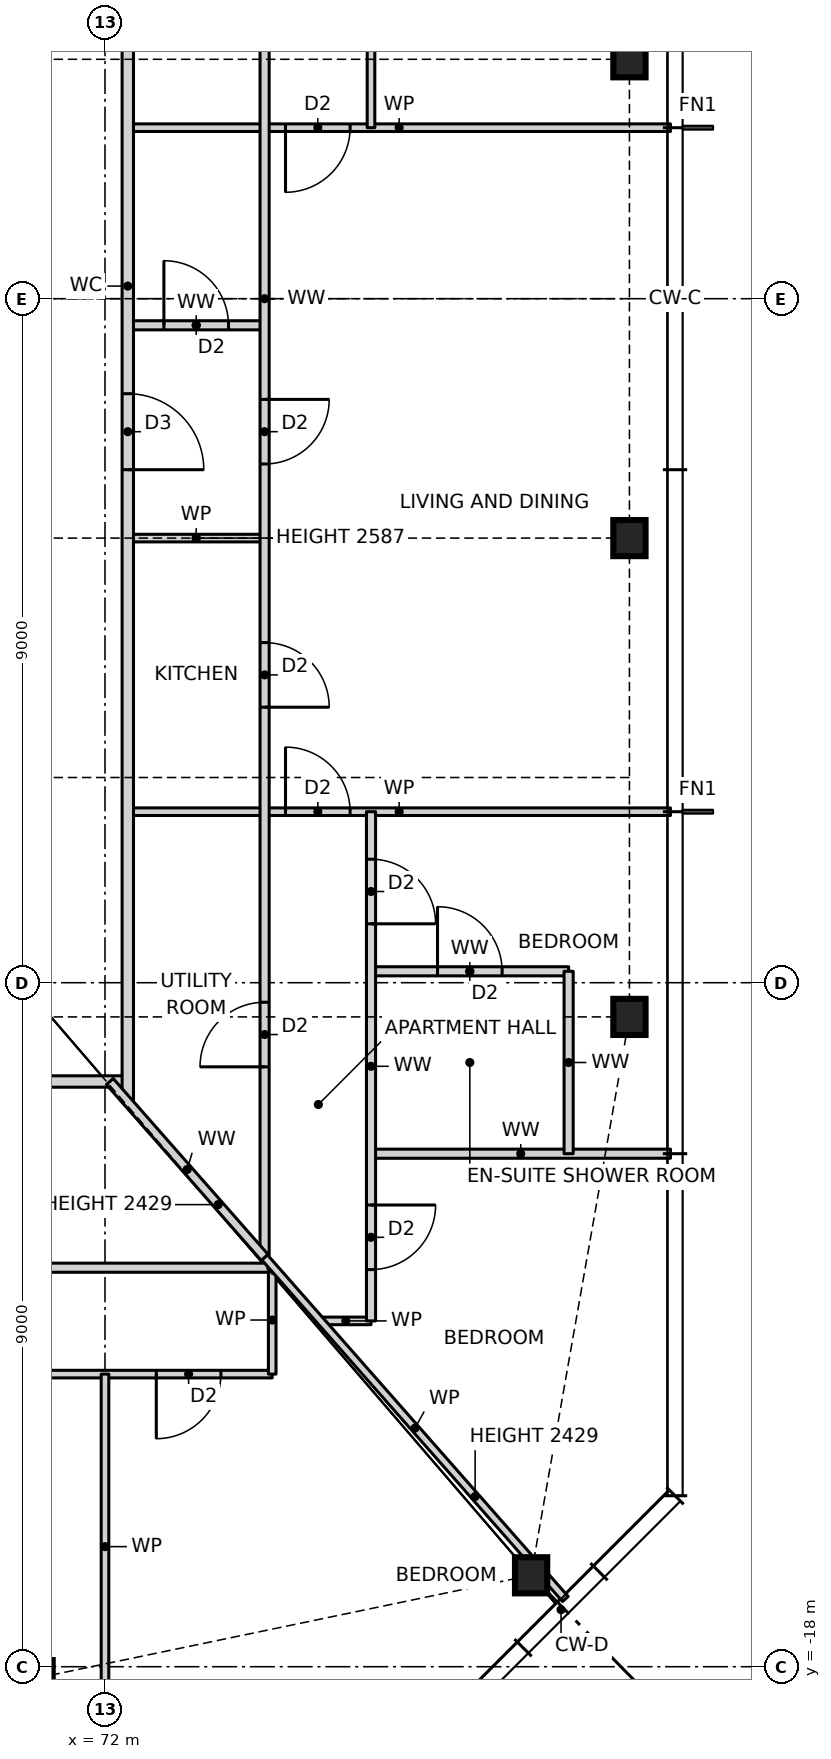
"""IFC4 building model, lengths in metres.
Left out: names, types, materials, properties, quantities, classifications, styles, units other than length and angle.
Written with IfcOpenShell. Run it as: python <this file> out.ifc"""

import sys

from ifc_helpers import new_model, si_unit, direction, frame, frame_2d, origin, origin_2d, place, context, subcontext, project, spatial, rectangle, i_section, extrude, element, fill, save


model = new_model("IFC4")
c1 = context("Model", 3, precision=1e-05, world=origin(), true_north=direction((0.0, 1.0)))
c2 = subcontext(c1, "Body", "Model", "MODEL_VIEW")
j1 = project(units=[si_unit("LENGTHUNIT", "METRE"), si_unit("PLANEANGLEUNIT", "RADIAN")], contexts=[c1])
p1 = place(None, origin())
s1 = spatial("IfcSite", under=j1, at=p1, CompositionType="ELEMENT")
p2 = place(p1, origin())
s2 = spatial("IfcBuilding", under=s1, at=p2, CompositionType="ELEMENT")
p3 = place(p2, frame((0.0, 0.0, 43.0)))
s3 = spatial("IfcBuildingStorey", under=s2, at=p3, CompositionType="ELEMENT", Elevation=43.0)
for number, where, z_axis, x_axis in (
    (1, (71.1, -18.15, 0.0), (0.0, 0.0, 1.0), (1.0, 0.0, 0.0)),
    (2, (77.606, -16.797, 0.0), (0.0, 0.0, 1.0), (1.0, 0.0, 0.0)),
    (3, (78.9, -9.45, 0.0), (0.0, 0.0, 1.0), (1.0, 0.0, 0.0)),
    (4, (78.9, -3.15, 0.0), (0.0, 0.0, 1.0), (1.0, 0.0, 0.0)),
    (5, (78.9, 3.15, 0.0), (0.0, 0.0, 1.0), (1.0, 0.0, 0.0)),
):
    element("IfcColumn", number, at=place(p3, frame(where, z_axis=z_axis, x_axis=x_axis)), inside=s3, PredefinedType="COLUMN", context=c2, shape_type="SweptSolid", body=[
        extrude(i_section(OverallWidth=0.424, OverallDepth=0.475, WebThickness=0.048, FlangeThickness=0.077, at=origin_2d()), origin(), (0.0, 0.0, 1.0), 3.5),
    ])
p4 = place(p3, frame((63.0, -14.15, 0.0), z_axis=(0.0, 0.0, 1.0), x_axis=(1.0, 0.0, 0.0)))
e6 = element("IfcWall", 6, at=p4, inside=s3, PredefinedType="PARTITIONING", context=c2, shape_type="SweptSolid", body=[
    extrude(rectangle(XDim=11.2, YDim=0.1, at=frame_2d((5.6, 0.0))), origin(), (0.0, 0.0, 1.0), 3.27),
])
p5 = place(p4, frame((1.825, 0.0, 0.0)))
e7 = element("IfcOpeningElement", 7, at=p5, cuts=e6, PredefinedType="OPENING", context=c2, shape_type="SweptSolid", body=[
    extrude(rectangle(XDim=0.85, YDim=2.1, at=frame_2d((0.425, 1.05))), frame((0.0, 0.06, 0.0), z_axis=(0.0, -1.0, 0.0), x_axis=(1.0, 0.0, 0.0)), (0.0, 0.0, 1.0), 0.12),
])
p6 = place(p4, frame((6.325, 0.0, 0.0)))
e8 = element("IfcOpeningElement", 8, at=p6, cuts=e6, PredefinedType="OPENING", context=c2, shape_type="SweptSolid", body=[
    extrude(rectangle(XDim=0.85, YDim=2.1, at=frame_2d((0.425, 1.05))), frame((0.0, 0.06, 0.0), z_axis=(0.0, -1.0, 0.0), x_axis=(1.0, 0.0, 0.0)), (0.0, 0.0, 1.0), 0.12),
])
p7 = place(p4, frame((9.675, 0.0, 0.0)))
e9 = element("IfcOpeningElement", 9, at=p7, cuts=e6, PredefinedType="OPENING", context=c2, shape_type="SweptSolid", body=[
    extrude(rectangle(XDim=0.85, YDim=2.1, at=frame_2d((0.425, 1.05))), frame((0.0, 0.06, 0.0), z_axis=(0.0, -1.0, 0.0), x_axis=(1.0, 0.0, 0.0)), (0.0, 0.0, 1.0), 0.12),
])
p8 = place(p3, frame((74.836, -13.45, 0.0), z_axis=(0.0, 0.0, 1.0), x_axis=(1.0, 0.0, 0.0)))
e10 = element("IfcWall", 10, at=p8, inside=s3, PredefinedType="PARTITIONING", context=c2, shape_type="SweptSolid", body=[
    extrude(rectangle(XDim=0.664, YDim=0.1, at=frame_2d((0.332, 0.0))), origin(), (0.0, 0.0, 1.0), 3.27),
])
p9 = place(p3, frame((54.0, -12.75, 0.0), z_axis=(0.0, 0.0, 1.0), x_axis=(1.0, 0.0, 0.0)))
e11 = element("IfcWall", 11, at=p9, inside=s3, PredefinedType="PARTITIONING", context=c2, shape_type="SweptSolid", body=[
    extrude(rectangle(XDim=20.2, YDim=0.12, at=frame_2d((10.1, 0.0))), origin(), (0.0, 0.0, 1.0), 3.27),
])
p10 = place(p9, frame((1.375, 0.0, 0.0)))
e12 = element("IfcOpeningElement", 12, at=p10, cuts=e11, PredefinedType="OPENING", context=c2, shape_type="SweptSolid", body=[
    extrude(rectangle(XDim=0.85, YDim=2.1, at=frame_2d((0.425, 1.05))), frame((0.0, 0.07, 0.0), z_axis=(0.0, -1.0, 0.0), x_axis=(1.0, 0.0, 0.0)), (0.0, 0.0, 1.0), 0.14),
])
p11 = place(p9, frame((4.575, 0.0, 0.0)))
e13 = element("IfcOpeningElement", 13, at=p11, cuts=e11, PredefinedType="OPENING", context=c2, shape_type="SweptSolid", body=[
    extrude(rectangle(XDim=0.85, YDim=2.1, at=frame_2d((0.425, 1.05))), frame((0.0, 0.07, 0.0), z_axis=(0.0, -1.0, 0.0), x_axis=(1.0, 0.0, 0.0)), (0.0, 0.0, 1.0), 0.14),
])
p12 = place(p9, frame((10.225, 0.0, 0.0)))
e14 = element("IfcOpeningElement", 14, at=p12, cuts=e11, PredefinedType="OPENING", context=c2, shape_type="SweptSolid", body=[
    extrude(rectangle(XDim=0.85, YDim=2.1, at=frame_2d((0.425, 1.05))), frame((0.0, 0.07, 0.0), z_axis=(0.0, -1.0, 0.0), x_axis=(1.0, 0.0, 0.0)), (0.0, 0.0, 1.0), 0.14),
])
p13 = place(p9, frame((15.825, 0.0, 0.0)))
e15 = element("IfcOpeningElement", 15, at=p13, cuts=e11, PredefinedType="OPENING", context=c2, shape_type="SweptSolid", body=[
    extrude(rectangle(XDim=0.85, YDim=2.1, at=frame_2d((0.425, 1.05))), frame((0.0, 0.07, 0.0), z_axis=(0.0, -1.0, 0.0), x_axis=(1.0, 0.0, 0.0)), (0.0, 0.0, 1.0), 0.14),
])
p14 = place(p3, frame((75.5, -11.25, 0.0), z_axis=(0.0, 0.0, 1.0), x_axis=(1.0, 0.0, 0.0)))
e16 = element("IfcWall", 16, at=p14, inside=s3, PredefinedType="PARTITIONING", context=c2, shape_type="SweptSolid", body=[
    extrude(rectangle(XDim=3.94, YDim=0.12, at=frame_2d((1.97, 0.0))), origin(), (0.0, 0.0, 1.0), 3.27),
])
p15 = place(p3, frame((53.7, -10.3, 0.0), z_axis=(0.0, 0.0, 1.0), x_axis=(1.0, 0.0, 0.0)))
e17 = element("IfcWall", 17, at=p15, inside=s3, PredefinedType="PARTITIONING", context=c2, shape_type="SweptSolid", body=[
    extrude(rectangle(XDim=18.6, YDim=0.15, at=frame_2d((9.3, 0.0))), origin(), (0.0, 0.0, 1.0), 3.27),
])
p16 = place(p15, frame((4.8, 0.0, 0.0)))
e18 = element("IfcOpeningElement", 18, at=p16, cuts=e17, PredefinedType="OPENING", context=c2, shape_type="SweptSolid", body=[
    extrude(rectangle(XDim=1.0, YDim=2.1, at=frame_2d((0.5, 1.05))), frame((0.0, 0.085, 0.0), z_axis=(0.0, -1.0, 0.0), x_axis=(1.0, 0.0, 0.0)), (0.0, 0.0, 1.0), 0.17),
])
p17 = place(p3, frame((75.5, -8.85, 0.0), z_axis=(0.0, 0.0, 1.0), x_axis=(1.0, 0.0, 0.0)))
e19 = element("IfcWall", 19, at=p17, inside=s3, PredefinedType="PARTITIONING", context=c2, shape_type="SweptSolid", body=[
    extrude(rectangle(XDim=2.6, YDim=0.12, at=frame_2d((1.3, 0.0))), origin(), (0.0, 0.0, 1.0), 3.27),
])
p18 = place(p17, frame((0.875, 0.0, 0.0)))
e20 = element("IfcOpeningElement", 20, at=p18, cuts=e19, PredefinedType="OPENING", context=c2, shape_type="SweptSolid", body=[
    extrude(rectangle(XDim=0.85, YDim=2.1, at=frame_2d((0.425, 1.05))), frame((0.0, 0.07, 0.0), z_axis=(0.0, -1.0, 0.0), x_axis=(1.0, 0.0, 0.0)), (0.0, 0.0, 1.0), 0.14),
])
p19 = place(p3, frame((72.3, -6.75, 0.0), z_axis=(0.0, 0.0, 1.0), x_axis=(1.0, 0.0, 0.0)))
e21 = element("IfcWall", 21, at=p19, inside=s3, PredefinedType="PARTITIONING", context=c2, shape_type="SweptSolid", body=[
    extrude(rectangle(XDim=7.14, YDim=0.1, at=frame_2d((3.57, 0.0))), origin(), (0.0, 0.0, 1.0), 3.27),
])
p20 = place(p19, frame((2.075, 0.0, 0.0)))
e22 = element("IfcOpeningElement", 22, at=p20, cuts=e21, PredefinedType="OPENING", context=c2, shape_type="SweptSolid", body=[
    extrude(rectangle(XDim=0.85, YDim=2.1, at=frame_2d((0.425, 1.05))), frame((0.0, 0.06, 0.0), z_axis=(0.0, -1.0, 0.0), x_axis=(1.0, 0.0, 0.0)), (0.0, 0.0, 1.0), 0.12),
])
p21 = place(p3, frame((72.3, -3.15, 0.0), z_axis=(0.0, 0.0, 1.0), x_axis=(1.0, 0.0, 0.0)))
e23 = element("IfcWall", 23, at=p21, inside=s3, PredefinedType="PARTITIONING", context=c2, shape_type="SweptSolid", body=[
    extrude(rectangle(XDim=1.8, YDim=0.1, at=frame_2d((0.9, 0.0))), origin(), (0.0, 0.0, 1.0), 2.587),
])
p22 = place(p3, frame((72.3, -0.35, 0.0), z_axis=(0.0, 0.0, 1.0), x_axis=(1.0, 0.0, 0.0)))
e24 = element("IfcWall", 24, at=p22, inside=s3, PredefinedType="PARTITIONING", context=c2, shape_type="SweptSolid", body=[
    extrude(rectangle(XDim=1.8, YDim=0.12, at=frame_2d((0.9, 0.0))), origin(), (0.0, 0.0, 1.0), 3.27),
])
p23 = place(p22, frame((0.475, 0.0, 0.0)))
e25 = element("IfcOpeningElement", 25, at=p23, cuts=e24, PredefinedType="OPENING", context=c2, shape_type="SweptSolid", body=[
    extrude(rectangle(XDim=0.85, YDim=2.1, at=frame_2d((0.425, 1.05))), frame((0.0, 0.07, 0.0), z_axis=(0.0, -1.0, 0.0), x_axis=(1.0, 0.0, 0.0)), (0.0, 0.0, 1.0), 0.14),
])
p24 = place(p3, frame((72.3, 2.25, 0.0), z_axis=(0.0, 0.0, 1.0), x_axis=(1.0, 0.0, 0.0)))
e26 = element("IfcWall", 26, at=p24, inside=s3, PredefinedType="PARTITIONING", context=c2, shape_type="SweptSolid", body=[
    extrude(rectangle(XDim=7.14, YDim=0.1, at=frame_2d((3.57, 0.0))), origin(), (0.0, 0.0, 1.0), 3.27),
])
p25 = place(p24, frame((2.075, 0.0, 0.0)))
e27 = element("IfcOpeningElement", 27, at=p25, cuts=e26, PredefinedType="OPENING", context=c2, shape_type="SweptSolid", body=[
    extrude(rectangle(XDim=0.85, YDim=2.1, at=frame_2d((0.425, 1.05))), frame((0.0, 0.06, 0.0), z_axis=(0.0, -1.0, 0.0), x_axis=(1.0, 0.0, 0.0)), (0.0, 0.0, 1.0), 0.12),
])
p26 = place(p3, frame((78.1, -11.25, 0.0), z_axis=(0.0, 0.0, 1.0), x_axis=(0.0, 1.0, 0.0)))
e28 = element("IfcWall", 28, at=p26, inside=s3, PredefinedType="PARTITIONING", context=c2, shape_type="SweptSolid", body=[
    extrude(rectangle(XDim=2.4, YDim=0.12, at=frame_2d((1.2, 0.0))), origin(), (0.0, 0.0, 1.0), 3.27),
])
p27 = place(p3, frame((75.5, -13.45, 0.0), z_axis=(0.0, 0.0, 1.0), x_axis=(0.0, 1.0, 0.0)))
e29 = element("IfcWall", 29, at=p27, inside=s3, PredefinedType="PARTITIONING", context=c2, shape_type="SweptSolid", body=[
    extrude(rectangle(XDim=6.7, YDim=0.12, at=frame_2d((3.35, 0.0))), origin(), (0.0, 0.0, 1.0), 3.27),
])
p28 = place(p27, frame((5.225, 0.0, 0.0)))
e30 = element("IfcOpeningElement", 30, at=p28, cuts=e29, PredefinedType="OPENING", context=c2, shape_type="SweptSolid", body=[
    extrude(rectangle(XDim=0.85, YDim=2.1, at=frame_2d((0.425, 1.05))), frame((0.0, 0.07, 0.0), z_axis=(0.0, -1.0, 0.0), x_axis=(1.0, 0.0, 0.0)), (0.0, 0.0, 1.0), 0.14),
])
p29 = place(p27, frame((0.675, 0.0, 0.0)))
e31 = element("IfcOpeningElement", 31, at=p29, cuts=e29, PredefinedType="OPENING", context=c2, shape_type="SweptSolid", body=[
    extrude(rectangle(XDim=0.85, YDim=2.1, at=frame_2d((0.425, 1.05))), frame((0.0, 0.07, 0.0), z_axis=(0.0, -1.0, 0.0), x_axis=(1.0, 0.0, 0.0)), (0.0, 0.0, 1.0), 0.14),
])
p30 = place(p3, frame((75.5, 2.25, 0.0), z_axis=(0.0, 0.0, 1.0), x_axis=(0.0, 1.0, 0.0)))
e32 = element("IfcWall", 32, at=p30, inside=s3, PredefinedType="PARTITIONING", context=c2, shape_type="SweptSolid", body=[
    extrude(rectangle(XDim=11.2, YDim=0.1, at=frame_2d((5.6, 0.0))), origin(), (0.0, 0.0, 1.0), 3.27),
])
p31 = place(p30, frame((1.825, 0.0, 0.0)))
e33 = element("IfcOpeningElement", 33, at=p31, cuts=e32, PredefinedType="OPENING", context=c2, shape_type="SweptSolid", body=[
    extrude(rectangle(XDim=0.85, YDim=2.1, at=frame_2d((0.425, 1.05))), frame((0.0, 0.06, 0.0), z_axis=(0.0, -1.0, 0.0), x_axis=(1.0, 0.0, 0.0)), (0.0, 0.0, 1.0), 0.12),
])
p32 = place(p30, frame((6.325, 0.0, 0.0)))
e34 = element("IfcOpeningElement", 34, at=p32, cuts=e32, PredefinedType="OPENING", context=c2, shape_type="SweptSolid", body=[
    extrude(rectangle(XDim=0.85, YDim=2.1, at=frame_2d((0.425, 1.05))), frame((0.0, 0.06, 0.0), z_axis=(0.0, -1.0, 0.0), x_axis=(1.0, 0.0, 0.0)), (0.0, 0.0, 1.0), 0.12),
])
p33 = place(p30, frame((9.675, 0.0, 0.0)))
e35 = element("IfcOpeningElement", 35, at=p33, cuts=e32, PredefinedType="OPENING", context=c2, shape_type="SweptSolid", body=[
    extrude(rectangle(XDim=0.85, YDim=2.1, at=frame_2d((0.425, 1.05))), frame((0.0, 0.06, 0.0), z_axis=(0.0, -1.0, 0.0), x_axis=(1.0, 0.0, 0.0)), (0.0, 0.0, 1.0), 0.12),
])
p34 = place(p3, frame((74.2, -14.15, 0.0), z_axis=(0.0, 0.0, 1.0), x_axis=(0.0, 1.0, 0.0)))
e36 = element("IfcWall", 36, at=p34, inside=s3, PredefinedType="PARTITIONING", context=c2, shape_type="SweptSolid", body=[
    extrude(rectangle(XDim=1.423, YDim=0.1, at=frame_2d((0.711, 0.0))), origin(), (0.0, 0.0, 1.0), 3.27),
])
p35 = place(p3, frame((74.1, -12.614, 0.0), z_axis=(0.0, 0.0, 1.0), x_axis=(0.0, 1.0, 0.0)))
e37 = element("IfcWall", 37, at=p35, inside=s3, PredefinedType="PARTITIONING", context=c2, shape_type="SweptSolid", body=[
    extrude(rectangle(XDim=25.228, YDim=0.12, at=frame_2d((12.614, 0.0))), origin(), (0.0, 0.0, 1.0), 3.27),
])
p36 = place(p35, frame((7.239, 0.0, 0.0)))
e38 = element("IfcOpeningElement", 38, at=p36, cuts=e37, PredefinedType="OPENING", context=c2, shape_type="SweptSolid", body=[
    extrude(rectangle(XDim=0.85, YDim=2.1, at=frame_2d((0.425, 1.05))), frame((0.0, 0.07, 0.0), z_axis=(0.0, -1.0, 0.0), x_axis=(1.0, 0.0, 0.0)), (0.0, 0.0, 1.0), 0.14),
])
p37 = place(p35, frame((10.439, 0.0, 0.0)))
e39 = element("IfcOpeningElement", 39, at=p37, cuts=e37, PredefinedType="OPENING", context=c2, shape_type="SweptSolid", body=[
    extrude(rectangle(XDim=0.85, YDim=2.1, at=frame_2d((0.425, 1.05))), frame((0.0, 0.07, 0.0), z_axis=(0.0, -1.0, 0.0), x_axis=(1.0, 0.0, 0.0)), (0.0, 0.0, 1.0), 0.14),
])
p38 = place(p35, frame((2.507, 0.0, 0.0)))
e40 = element("IfcOpeningElement", 40, at=p38, cuts=e37, PredefinedType="OPENING", context=c2, shape_type="SweptSolid", body=[
    extrude(rectangle(XDim=0.85, YDim=2.1, at=frame_2d((0.425, 1.05))), frame((0.0, 0.07, 0.0), z_axis=(0.0, -1.0, 0.0), x_axis=(1.0, 0.0, 0.0)), (0.0, 0.0, 1.0), 0.14),
])
p39 = place(p35, frame((16.639, 0.0, 0.0)))
e41 = element("IfcOpeningElement", 41, at=p39, cuts=e37, PredefinedType="OPENING", context=c2, shape_type="SweptSolid", body=[
    extrude(rectangle(XDim=0.85, YDim=2.1, at=frame_2d((0.425, 1.05))), frame((0.0, 0.07, 0.0), z_axis=(0.0, -1.0, 0.0), x_axis=(1.0, 0.0, 0.0)), (0.0, 0.0, 1.0), 0.14),
])
p40 = place(p35, frame((21.821, 0.0, 0.0)))
e42 = element("IfcOpeningElement", 42, at=p40, cuts=e37, PredefinedType="OPENING", context=c2, shape_type="SweptSolid", body=[
    extrude(rectangle(XDim=0.85, YDim=2.1, at=frame_2d((0.425, 1.05))), frame((0.0, 0.07, 0.0), z_axis=(0.0, -1.0, 0.0), x_axis=(1.0, 0.0, 0.0)), (0.0, 0.0, 1.0), 0.14),
])
p41 = place(p3, frame((72.3, -10.568, 0.0), z_axis=(0.0, 0.0, 1.0), x_axis=(0.0, 1.0, 0.0)))
e43 = element("IfcWall", 43, at=p41, inside=s3, PredefinedType="PARTITIONING", context=c2, shape_type="SweptSolid", body=[
    extrude(rectangle(XDim=21.468, YDim=0.15, at=frame_2d((10.734, 0.0))), origin(), (0.0, 0.0, 1.0), 3.27),
])
p42 = place(p41, frame((8.318, 0.0, 0.0)))
e44 = element("IfcOpeningElement", 44, at=p42, cuts=e43, PredefinedType="OPENING", context=c2, shape_type="SweptSolid", body=[
    extrude(rectangle(XDim=1.0, YDim=2.1, at=frame_2d((0.5, 1.05))), frame((0.0, 0.085, 0.0), z_axis=(0.0, -1.0, 0.0), x_axis=(1.0, 0.0, 0.0)), (0.0, 0.0, 1.0), 0.17),
])
p43 = place(p3, frame((72.0, -18.69, 0.0), z_axis=(0.0, 0.0, 1.0), x_axis=(0.0, 1.0, 0.0)))
e45 = element("IfcWall", 45, at=p43, inside=s3, PredefinedType="PARTITIONING", context=c2, shape_type="SweptSolid", body=[
    extrude(rectangle(XDim=4.54, YDim=0.1, at=frame_2d((2.27, 0.0))), origin(), (0.0, 0.0, 1.0), 3.27),
])
p44 = place(p3, frame((78.057, -17.109, 0.0), z_axis=(0.0, 0.0, 1.0), x_axis=(-0.660775837956, 0.750583301156, 0.0)))
e46 = element("IfcWall", 46, at=p44, inside=s3, PredefinedType="PARTITIONING", context=c2, shape_type="SweptSolid", body=[
    extrude(rectangle(XDim=5.989, YDim=0.1, at=frame_2d((2.994, 0.0))), origin(), (0.0, 0.0, 1.0), 2.429),
])
p45 = place(p3, frame((74.1, -12.614, 0.0), z_axis=(0.0, 0.0, 1.0), x_axis=(-0.660767161141, 0.750590939699, 0.0)))
e47 = element("IfcWall", 47, at=p45, inside=s3, PredefinedType="PARTITIONING", context=c2, shape_type="SweptSolid", body=[
    extrude(rectangle(XDim=3.082, YDim=0.12, at=frame_2d((1.541, 0.0))), origin(), (0.0, 0.0, 1.0), 2.429),
])
p46 = place(p7, frame((0.85, 0.0, 0.0), z_axis=(0.0, 0.0, 1.0), x_axis=(-1.0, 0.0, 0.0)))
e48 = element("IfcDoor", 48, at=p46, inside=s3, OperationType="SINGLE_SWING_RIGHT", PredefinedType="DOOR", context=c2, shape_type="SweptSolid", body=[
    extrude(rectangle(XDim=0.85, YDim=2.1, at=frame_2d((0.425, 1.05))), frame((0.0, 0.025, 0.0), z_axis=(0.0, -1.0, 0.0), x_axis=(1.0, 0.0, 0.0)), (0.0, 0.0, 1.0), 0.05),
])
fill(e9, e48)
p47 = place(p36, frame((0.85, 0.0, 0.0), z_axis=(0.0, 0.0, 1.0), x_axis=(-1.0, 0.0, 0.0)))
e49 = element("IfcDoor", 49, at=p47, inside=s3, OperationType="SINGLE_SWING_RIGHT", PredefinedType="DOOR", context=c2, shape_type="SweptSolid", body=[
    extrude(rectangle(XDim=0.85, YDim=2.1, at=frame_2d((0.425, 1.05))), frame((0.0, 0.025, 0.0), z_axis=(0.0, -1.0, 0.0), x_axis=(1.0, 0.0, 0.0)), (0.0, 0.0, 1.0), 0.05),
])
fill(e38, e49)
p48 = place(p42, frame((1.0, 0.0, 0.0), z_axis=(0.0, 0.0, 1.0), x_axis=(-1.0, 0.0, 0.0)))
e50 = element("IfcDoor", 50, at=p48, inside=s3, OperationType="SINGLE_SWING_RIGHT", PredefinedType="DOOR", context=c2, shape_type="SweptSolid", body=[
    extrude(rectangle(XDim=1.0, YDim=2.1, at=frame_2d((0.5, 1.05))), frame((0.0, 0.025, 0.0), z_axis=(0.0, -1.0, 0.0), x_axis=(1.0, 0.0, 0.0)), (0.0, 0.0, 1.0), 0.05),
])
fill(e44, e50)
p49 = place(p37, frame((0.85, 0.0, 0.0), z_axis=(0.0, 0.0, 1.0), x_axis=(-1.0, 0.0, 0.0)))
e51 = element("IfcDoor", 51, at=p49, inside=s3, OperationType="SINGLE_SWING_LEFT", PredefinedType="DOOR", context=c2, shape_type="SweptSolid", body=[
    extrude(rectangle(XDim=0.85, YDim=2.1, at=frame_2d((0.425, 1.05))), frame((0.0, 0.025, 0.0), z_axis=(0.0, -1.0, 0.0), x_axis=(1.0, 0.0, 0.0)), (0.0, 0.0, 1.0), 0.05),
])
fill(e39, e51)
p50 = place(p23, origin())
e52 = element("IfcDoor", 52, at=p50, inside=s3, OperationType="SINGLE_SWING_LEFT", PredefinedType="DOOR", context=c2, shape_type="SweptSolid", body=[
    extrude(rectangle(XDim=0.85, YDim=2.1, at=frame_2d((0.425, 1.05))), frame((0.0, 0.025, 0.0), z_axis=(0.0, -1.0, 0.0), x_axis=(1.0, 0.0, 0.0)), (0.0, 0.0, 1.0), 0.05),
])
fill(e25, e52)
p51 = place(p20, origin())
e53 = element("IfcDoor", 53, at=p51, inside=s3, OperationType="SINGLE_SWING_LEFT", PredefinedType="DOOR", context=c2, shape_type="SweptSolid", body=[
    extrude(rectangle(XDim=0.85, YDim=2.1, at=frame_2d((0.425, 1.05))), frame((0.0, 0.025, 0.0), z_axis=(0.0, -1.0, 0.0), x_axis=(1.0, 0.0, 0.0)), (0.0, 0.0, 1.0), 0.05),
])
fill(e22, e53)
p52 = place(p18, origin())
e54 = element("IfcDoor", 54, at=p52, inside=s3, OperationType="SINGLE_SWING_LEFT", PredefinedType="DOOR", context=c2, shape_type="SweptSolid", body=[
    extrude(rectangle(XDim=0.85, YDim=2.1, at=frame_2d((0.425, 1.05))), frame((0.0, 0.025, 0.0), z_axis=(0.0, -1.0, 0.0), x_axis=(1.0, 0.0, 0.0)), (0.0, 0.0, 1.0), 0.05),
])
fill(e20, e54)
p53 = place(p28, frame((0.85, 0.0, 0.0), z_axis=(0.0, 0.0, 1.0), x_axis=(-1.0, 0.0, 0.0)))
e55 = element("IfcDoor", 55, at=p53, inside=s3, OperationType="SINGLE_SWING_RIGHT", PredefinedType="DOOR", context=c2, shape_type="SweptSolid", body=[
    extrude(rectangle(XDim=0.85, YDim=2.1, at=frame_2d((0.425, 1.05))), frame((0.0, 0.025, 0.0), z_axis=(0.0, -1.0, 0.0), x_axis=(1.0, 0.0, 0.0)), (0.0, 0.0, 1.0), 0.05),
])
fill(e30, e55)
p54 = place(p29, frame((0.85, 0.0, 0.0), z_axis=(0.0, 0.0, 1.0), x_axis=(-1.0, 0.0, 0.0)))
e56 = element("IfcDoor", 56, at=p54, inside=s3, OperationType="SINGLE_SWING_LEFT", PredefinedType="DOOR", context=c2, shape_type="SweptSolid", body=[
    extrude(rectangle(XDim=0.85, YDim=2.1, at=frame_2d((0.425, 1.05))), frame((0.0, 0.025, 0.0), z_axis=(0.0, -1.0, 0.0), x_axis=(1.0, 0.0, 0.0)), (0.0, 0.0, 1.0), 0.05),
])
fill(e31, e56)
p55 = place(p38, origin())
e57 = element("IfcDoor", 57, at=p55, inside=s3, OperationType="SINGLE_SWING_LEFT", PredefinedType="DOOR", context=c2, shape_type="SweptSolid", body=[
    extrude(rectangle(XDim=0.85, YDim=2.1, at=frame_2d((0.425, 1.05))), frame((0.0, 0.025, 0.0), z_axis=(0.0, -1.0, 0.0), x_axis=(1.0, 0.0, 0.0)), (0.0, 0.0, 1.0), 0.05),
])
fill(e40, e57)
p56 = place(p25, frame((0.85, 0.0, 0.0), z_axis=(0.0, 0.0, 1.0), x_axis=(-1.0, 0.0, 0.0)))
e58 = element("IfcDoor", 58, at=p56, inside=s3, OperationType="SINGLE_SWING_RIGHT", PredefinedType="DOOR", context=c2, shape_type="SweptSolid", body=[
    extrude(rectangle(XDim=0.85, YDim=2.1, at=frame_2d((0.425, 1.05))), frame((0.0, 0.025, 0.0), z_axis=(0.0, -1.0, 0.0), x_axis=(1.0, 0.0, 0.0)), (0.0, 0.0, 1.0), 0.05),
])
fill(e27, e58)
save(model, sys.argv[1])
